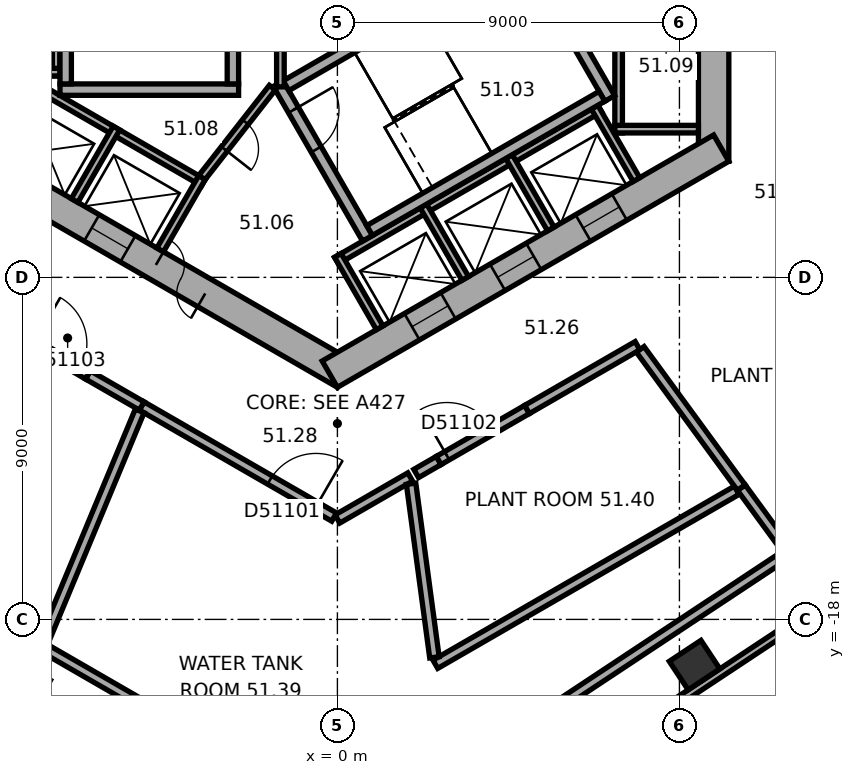
"""IFC4 building model, lengths in metres.
Left out: names, types, materials, properties, quantities, classifications, styles, units other than length and angle.
Written with IfcOpenShell. Run it as: python <this file> out.ifc"""

import sys

from ifc_helpers import new_model, si_unit, direction, frame, frame_2d, origin, origin_2d, place, context, subcontext, project, spatial, rectangle, extrude, element, fill, save


model = new_model("IFC4")
c1 = context("Model", 3, precision=1e-05, world=origin(), true_north=direction((0.0, 1.0)))
c2 = subcontext(c1, "Body", "Model", "MODEL_VIEW")
j1 = project(units=[si_unit("LENGTHUNIT", "METRE"), si_unit("PLANEANGLEUNIT", "RADIAN")], contexts=[c1])
p1 = place(None, origin())
s1 = spatial("IfcSite", under=j1, at=p1, CompositionType="ELEMENT")
p2 = place(p1, origin())
s2 = spatial("IfcBuilding", under=s1, at=p2, CompositionType="ELEMENT")
p3 = place(p2, frame((0.0, 0.0, 205.8)))
s3 = spatial("IfcBuildingStorey", under=s2, at=p3, CompositionType="ELEMENT", Elevation=205.8)
p4 = place(p3, frame((9.398, -19.202, 0.0), z_axis=(0.0, 0.0, 1.0), x_axis=(0.833885822067, 0.551936985312, 0.0)))
e1 = element("IfcColumn", 1, at=p4, inside=s3, PredefinedType="COLUMN", context=c2, shape_type="SweptSolid", body=[
    extrude(rectangle(XDim=1.0, YDim=0.9, at=origin_2d()), origin(), (0.0, 0.0, 1.0), 4.8),
])
p5 = place(p3, frame((9.9, -5.947, 0.0), z_axis=(0.0, 0.0, 1.0), x_axis=(0.0, 1.0, 0.0)))
e2 = element("IfcWall", 2, at=p5, inside=s3, PredefinedType="SHEAR", context=c2, shape_type="SweptSolid", body=[
    extrude(rectangle(XDim=11.894, YDim=0.8, at=frame_2d((5.947, 0.0))), origin(), (0.0, 0.0, 1.0), 4.8),
])
p6 = place(p5, frame((6.147, 0.0, 0.0)))
e3 = element("IfcOpeningElement", 3, at=p6, cuts=e2, PredefinedType="OPENING", context=c2, shape_type="SweptSolid", body=[
    extrude(rectangle(XDim=1.5, YDim=2.1, at=frame_2d((0.75, 1.05))), frame((0.0, 0.41, 0.0), z_axis=(0.0, -1.0, 0.0), x_axis=(1.0, 0.0, 0.0)), (0.0, 0.0, 1.0), 0.82),
])
p7 = place(p5, frame((2.997, 0.0, 0.0)))
e4 = element("IfcOpeningElement", 4, at=p7, cuts=e2, PredefinedType="OPENING", context=c2, shape_type="SweptSolid", body=[
    extrude(rectangle(XDim=0.9, YDim=2.1, at=frame_2d((0.45, 1.05))), frame((0.0, 0.41, 0.0), z_axis=(0.0, -1.0, 0.0), x_axis=(1.0, 0.0, 0.0)), (0.0, 0.0, 1.0), 0.82),
])
p8 = place(p3, frame((-10.1, -5.6, 0.0), z_axis=(0.0, 0.0, 1.0), x_axis=(0.866023897231, -0.500002609418, 0.0)))
e5 = element("IfcWall", 5, at=p8, inside=s3, PredefinedType="SHEAR", context=c2, shape_type="SweptSolid", body=[
    extrude(rectangle(XDim=11.894, YDim=0.8, at=frame_2d((5.947, 0.0))), origin(), (0.0, 0.0, 1.0), 4.8),
])
p9 = place(p8, frame((6.147, 0.0, 0.0)))
e6 = element("IfcOpeningElement", 6, at=p9, cuts=e5, PredefinedType="OPENING", context=c2, shape_type="SweptSolid", body=[
    extrude(rectangle(XDim=1.5, YDim=2.1, at=frame_2d((0.75, 1.05))), frame((0.0, 0.41, 0.0), z_axis=(0.0, -1.0, 0.0), x_axis=(1.0, 0.0, 0.0)), (0.0, 0.0, 1.0), 0.82),
])
p10 = place(p8, frame((1.597, 0.0, 0.0)))
e7 = element("IfcOpeningElement", 7, at=p10, cuts=e5, PredefinedType="OPENING", context=c2, shape_type="SweptSolid", body=[
    extrude(rectangle(XDim=1.1, YDim=2.1, at=frame_2d((0.55, 1.05))), frame((0.0, 0.41, 0.0), z_axis=(0.0, -1.0, 0.0), x_axis=(1.0, 0.0, 0.0)), (0.0, 0.0, 1.0), 0.82),
])
p11 = place(p8, frame((4.197, 0.0, 0.0)))
e8 = element("IfcOpeningElement", 8, at=p11, cuts=e5, PredefinedType="OPENING", context=c2, shape_type="SweptSolid", body=[
    extrude(rectangle(XDim=1.1, YDim=2.1, at=frame_2d((0.55, 1.05))), frame((0.0, 0.41, 0.0), z_axis=(0.0, -1.0, 0.0), x_axis=(1.0, 0.0, 0.0)), (0.0, 0.0, 1.0), 0.82),
])
p12 = place(p3, frame((-0.2, -11.547, 0.0), z_axis=(0.0, 0.0, 1.0), x_axis=(0.866023897231, 0.500002609418, 0.0)))
e9 = element("IfcWall", 9, at=p12, inside=s3, PredefinedType="SHEAR", context=c2, shape_type="SweptSolid", body=[
    extrude(rectangle(XDim=11.894, YDim=0.8, at=frame_2d((5.947, 0.0))), origin(), (0.0, 0.0, 1.0), 4.8),
])
p13 = place(p12, frame((2.497, 0.0, 0.0)))
e10 = element("IfcOpeningElement", 10, at=p13, cuts=e9, PredefinedType="OPENING", context=c2, shape_type="SweptSolid", body=[
    extrude(rectangle(XDim=1.1, YDim=2.1, at=frame_2d((0.55, 1.05))), frame((0.0, 0.41, 0.0), z_axis=(0.0, -1.0, 0.0), x_axis=(1.0, 0.0, 0.0)), (0.0, 0.0, 1.0), 0.82),
])
p14 = place(p12, frame((5.097, 0.0, 0.0)))
e11 = element("IfcOpeningElement", 11, at=p14, cuts=e9, PredefinedType="OPENING", context=c2, shape_type="SweptSolid", body=[
    extrude(rectangle(XDim=1.1, YDim=2.1, at=frame_2d((0.55, 1.05))), frame((0.0, 0.41, 0.0), z_axis=(0.0, -1.0, 0.0), x_axis=(1.0, 0.0, 0.0)), (0.0, 0.0, 1.0), 0.82),
])
p15 = place(p12, frame((7.697, 0.0, 0.0)))
e12 = element("IfcOpeningElement", 12, at=p15, cuts=e9, PredefinedType="OPENING", context=c2, shape_type="SweptSolid", body=[
    extrude(rectangle(XDim=1.1, YDim=2.1, at=frame_2d((0.55, 1.05))), frame((0.0, 0.41, 0.0), z_axis=(0.0, -1.0, 0.0), x_axis=(1.0, 0.0, 0.0)), (0.0, 0.0, 1.0), 0.82),
])
for number, where, z_axis, x_axis in (
    (13, (-18.789, -14.267, 0.0), (0.0, 0.0, 1.0), (0.866, -0.5, 0.0)),
    (14, (2.911, -24.156, 0.0), (0.0, 0.0, 1.0), (0.834, 0.552, 0.0)),
):
    element("IfcWall", number, at=place(p3, frame(where, z_axis=z_axis, x_axis=x_axis)), inside=s3, PredefinedType="STANDARD", context=c2, shape_type="SweptSolid", body=[
        extrude(rectangle(XDim=20.044, YDim=0.2, at=frame_2d((10.022, 0.0))), origin(), (0.0, 0.0, 1.0), 4.8),
    ])
p16 = place(p3, frame((7.4, -5.2, 0.0), z_axis=(0.0, 0.0, 1.0), x_axis=(0.0, 1.0, 0.0)))
e15 = element("IfcWall", 15, at=p16, inside=s3, PredefinedType="PARTITIONING", context=c2, shape_type="SweptSolid", body=[
    extrude(rectangle(XDim=5.4, YDim=0.2, at=frame_2d((2.7, 0.0))), origin(), (0.0, 0.0, 1.0), 4.52),
])
p17 = place(p3, frame((7.3, -5.1, 0.0), z_axis=(0.0, 0.0, 1.0), x_axis=(1.0, 0.0, 0.0)))
e16 = element("IfcWall", 16, at=p17, inside=s3, PredefinedType="PARTITIONING", context=c2, shape_type="SweptSolid", body=[
    extrude(rectangle(XDim=2.2, YDim=0.2, at=frame_2d((1.1, 0.0))), origin(), (0.0, 0.0, 1.0), 4.52),
])
p18 = place(p3, frame((-7.4, 4.3, 0.0), z_axis=(0.0, 0.0, 1.0), x_axis=(0.0, -1.0, 0.0)))
e17 = element("IfcWall", 17, at=p18, inside=s3, PredefinedType="PARTITIONING", context=c2, shape_type="SweptSolid", body=[
    extrude(rectangle(XDim=8.0, YDim=0.2, at=frame_2d((4.0, 0.0))), origin(), (0.0, 0.0, 1.0), 4.52),
])
p19 = place(p3, frame((-7.3, -3.6, 0.0), z_axis=(0.0, 0.0, 1.0), x_axis=(-1.0, 0.0, 0.0)))
e18 = element("IfcWall", 18, at=p19, inside=s3, PredefinedType="PARTITIONING", context=c2, shape_type="SweptSolid", body=[
    extrude(rectangle(XDim=2.2, YDim=0.2, at=frame_2d((1.1, 0.0))), origin(), (0.0, 0.0, 1.0), 4.52),
])
p20 = place(p3, frame((-8.203, -3.809, 0.0), z_axis=(0.0, 0.0, 1.0), x_axis=(0.866028230842, -0.499995103361, 0.0)))
e19 = element("IfcWall", 19, at=p20, inside=s3, PredefinedType="PARTITIONING", context=c2, shape_type="SweptSolid", body=[
    extrude(rectangle(XDim=5.4, YDim=0.2, at=frame_2d((2.7, 0.0))), origin(), (0.0, 0.0, 1.0), 4.52),
])
p21 = place(p3, frame((-5.815, -5.072, 0.0), z_axis=(0.0, 0.0, 1.0), x_axis=(-0.499946605688, -0.86605622881, 0.0)))
e20 = element("IfcWall", 20, at=p21, inside=s3, PredefinedType="PARTITIONING", context=c2, shape_type="SweptSolid", body=[
    extrude(rectangle(XDim=2.2, YDim=0.2, at=frame_2d((1.1, 0.0))), origin(), (0.0, 0.0, 1.0), 4.52),
])
p22 = place(p3, frame((-3.563, -6.372, 0.0), z_axis=(0.0, 0.0, 1.0), x_axis=(-0.499994660107, -0.866028486751, 0.0)))
e21 = element("IfcWall", 21, at=p22, inside=s3, PredefinedType="PARTITIONING", context=c2, shape_type="SweptSolid", body=[
    extrude(rectangle(XDim=2.2, YDim=0.2, at=frame_2d((1.1, 0.0))), origin(), (0.0, 0.0, 1.0), 4.52),
])
p23 = place(p3, frame((-0.024, -8.559, 0.0), z_axis=(0.0, 0.0, 1.0), x_axis=(0.866026010844, 0.49999894854, 0.0)))
e22 = element("IfcWall", 22, at=p23, inside=s3, PredefinedType="PARTITIONING", context=c2, shape_type="SweptSolid", body=[
    extrude(rectangle(XDim=8.0, YDim=0.2, at=frame_2d((4.0, 0.0))), origin(), (0.0, 0.0, 1.0), 4.52),
])
for number, where, z_axis, x_axis in (
    (23, (0.013, -8.422, 0.0), (0.0, 0.0, 1.0), (0.5, -0.866, 0.0)),
    (24, (2.264, -7.122, 0.0), (0.0, 0.0, 1.0), (0.5, -0.866, 0.0)),
    (25, (4.516, -5.822, 0.0), (0.0, 0.0, 1.0), (0.5, -0.866, 0.0)),
    (26, (6.768, -4.522, 0.0), (0.0, 0.0, 1.0), (0.5, -0.866, 0.0)),
):
    element("IfcWall", number, at=place(p3, frame(where, z_axis=z_axis, x_axis=x_axis)), inside=s3, PredefinedType="PARTITIONING", context=c2, shape_type="SweptSolid", body=[
        extrude(rectangle(XDim=2.2, YDim=0.2, at=frame_2d((1.1, 0.0))), origin(), (0.0, 0.0, 1.0), 4.52),
    ])
p24 = place(p3, frame((-2.6, -4.06, 0.0), z_axis=(0.0, 0.0, 1.0), x_axis=(-1.0, 0.0, 0.0)))
e27 = element("IfcWall", 27, at=p24, inside=s3, PredefinedType="SHEAR", context=c2, shape_type="SweptSolid", body=[
    extrude(rectangle(XDim=4.7, YDim=0.3, at=frame_2d((2.35, 0.0))), origin(), (0.0, 0.0, 1.0), 4.52),
])
for number, where, z_axis, x_axis in (
    (28, (-2.75, 3.15, 0.0), (0.0, 0.0, 1.0), (0.0, -1.0, 0.0)),
    (29, (-7.15, 3.15, 0.0), (0.0, 0.0, 1.0), (0.0, -1.0, 0.0)),
):
    element("IfcWall", number, at=place(p3, frame(where, z_axis=z_axis, x_axis=x_axis)), inside=s3, PredefinedType="SHEAR", context=c2, shape_type="SweptSolid", body=[
        extrude(rectangle(XDim=7.06, YDim=0.3, at=frame_2d((3.53, 0.0))), origin(), (0.0, 0.0, 1.0), 4.52),
    ])
p25 = place(p3, frame((-1.558, -3.902, 0.0), z_axis=(0.0, 0.0, 1.0), x_axis=(0.499977259774, -0.866038532462, 0.0)))
e30 = element("IfcWall", 30, at=p25, inside=s3, PredefinedType="SHEAR", context=c2, shape_type="SweptSolid", body=[
    extrude(rectangle(XDim=4.7, YDim=0.3, at=frame_2d((2.35, 0.0))), origin(), (0.0, 0.0, 1.0), 4.52),
])
p26 = place(p25, frame((0.8, 0.0, 0.0)))
e31 = element("IfcOpeningElement", 31, at=p26, cuts=e30, PredefinedType="OPENING", context=c2, shape_type="SweptSolid", body=[
    extrude(rectangle(XDim=1.2, YDim=2.1, at=frame_2d((0.6, 1.05))), frame((0.0, 0.16, 0.0), z_axis=(0.0, -1.0, 0.0), x_axis=(1.0, 0.0, 0.0)), (0.0, 0.0, 1.0), 0.32),
])
p27 = place(p3, frame((4.816, -0.222, 0.0), z_axis=(0.0, 0.0, 1.0), x_axis=(0.499977259774, -0.866038532462, 0.0)))
e32 = element("IfcWall", 32, at=p27, inside=s3, PredefinedType="SHEAR", context=c2, shape_type="SweptSolid", body=[
    extrude(rectangle(XDim=4.7, YDim=0.3, at=frame_2d((2.35, 0.0))), origin(), (0.0, 0.0, 1.0), 4.52),
])
for number, where, z_axis, x_axis in (
    (33, (-1.353, -3.957, 0.0), (0.0, 0.0, 1.0), (0.866, 0.5, 0.0)),
    (34, (0.847, -7.767, 0.0), (0.0, 0.0, 1.0), (0.866, 0.5, 0.0)),
):
    element("IfcWall", number, at=place(p3, frame(where, z_axis=z_axis, x_axis=x_axis)), inside=s3, PredefinedType="SHEAR", context=c2, shape_type="SweptSolid", body=[
        extrude(rectangle(XDim=7.06, YDim=0.3, at=frame_2d((3.53, 0.0))), origin(), (0.0, 0.0, 1.0), 4.52),
    ])
p28 = place(p3, frame((-1.712, -4.008, 0.0), z_axis=(0.0, 0.0, 1.0), x_axis=(-0.616549420702, -0.787316208287, 0.0)))
e35 = element("IfcWall", 35, at=p28, inside=s3, PredefinedType="PARTITIONING", context=c2, shape_type="SweptSolid", body=[
    extrude(rectangle(XDim=3.002, YDim=0.2, at=frame_2d((1.501, 0.0))), origin(), (0.0, 0.0, 1.0), 4.52),
])
p29 = place(p28, frame((1.15, 0.0, 0.0)))
e36 = element("IfcOpeningElement", 36, at=p29, cuts=e35, PredefinedType="OPENING", context=c2, shape_type="SweptSolid", body=[
    extrude(rectangle(XDim=0.9, YDim=2.1, at=frame_2d((0.45, 1.05))), frame((0.0, 0.11, 0.0), z_axis=(0.0, -1.0, 0.0), x_axis=(1.0, 0.0, 0.0)), (0.0, 0.0, 1.0), 0.22),
])
p30 = place(p3, frame((-1.5, -3.988, 0.0), z_axis=(0.0, 0.0, 1.0), x_axis=(0.0, 1.0, 0.0)))
e37 = element("IfcWall", 37, at=p30, inside=s3, PredefinedType="PARTITIONING", context=c2, shape_type="SweptSolid", body=[
    extrude(rectangle(XDim=7.977, YDim=0.2, at=frame_2d((3.988, 0.0))), origin(), (0.0, 0.0, 1.0), 4.52),
])
p31 = place(p3, frame((-0.988, -22.639, 0.0), z_axis=(0.0, 0.0, 1.0), x_axis=(-0.866009406207, 0.500027707594, 0.0)))
e38 = element("IfcWall", 38, at=p31, inside=s3, PredefinedType="SOLIDWALL", context=c2, shape_type="SweptSolid", body=[
    extrude(rectangle(XDim=7.846, YDim=0.25, at=frame_2d((3.923, 0.0))), origin(), (0.0, 0.0, 1.0), 4.02),
])
p32 = place(p3, frame((11.873, -16.251, 0.0), z_axis=(0.0, 0.0, 1.0), x_axis=(-0.833861924464, -0.551973088953, 0.0)))
e39 = element("IfcWall", 39, at=p32, inside=s3, PredefinedType="SOLIDWALL", context=c2, shape_type="SweptSolid", body=[
    extrude(rectangle(XDim=10.651, YDim=0.25, at=frame_2d((5.326, 0.0))), origin(), (0.0, 0.0, 1.0), 4.02),
])
p33 = place(p3, frame((11.796, -16.128, 0.0), z_axis=(0.0, 0.0, 1.0), x_axis=(-0.59041584791, 0.807099204891, 0.0)))
e40 = element("IfcWall", 40, at=p33, inside=s3, PredefinedType="SOLIDWALL", context=c2, shape_type="SweptSolid", body=[
    extrude(rectangle(XDim=1.977, YDim=0.25, at=frame_2d((0.989, 0.0))), origin(), (0.0, 0.0, 1.0), 3.6),
])
p34 = place(p3, frame((0.0, -15.357, 0.0), z_axis=(0.0, 0.0, 1.0), x_axis=(0.866060565847, 0.499939092575, 0.0)))
e41 = element("IfcWall", 41, at=p34, inside=s3, PredefinedType="SOLIDWALL", context=c2, shape_type="SweptSolid", body=[
    extrude(rectangle(XDim=2.211, YDim=0.25, at=frame_2d((1.105, 0.0))), origin(), (0.0, 0.0, 1.0), 4.52),
])
p35 = place(p3, frame((-0.087, -15.308, 0.0), z_axis=(0.0, 0.0, 1.0), x_axis=(-0.866016588558, 0.50001526811, 0.0)))
e42 = element("IfcWall", 42, at=p35, inside=s3, PredefinedType="SOLIDWALL", context=c2, shape_type="SweptSolid", body=[
    extrude(rectangle(XDim=5.846, YDim=0.25, at=frame_2d((2.923, 0.0))), origin(), (0.0, 0.0, 1.0), 4.52),
])
p36 = place(p35, frame((0.55, 0.0, 0.0)))
e43 = element("IfcOpeningElement", 43, at=p36, cuts=e42, PredefinedType="OPENING", context=c2, shape_type="SweptSolid", body=[
    extrude(rectangle(XDim=1.4, YDim=2.1, at=frame_2d((0.7, 1.05))), frame((0.0, 0.135, 0.0), z_axis=(0.0, -1.0, 0.0), x_axis=(1.0, 0.0, 0.0)), (0.0, 0.0, 1.0), 0.27),
])
p37 = place(p3, frame((10.508, -14.603, 0.0), z_axis=(0.0, 0.0, 1.0), x_axis=(-0.86603774239, -0.499978628299, 0.0)))
e44 = element("IfcWall", 44, at=p37, inside=s3, PredefinedType="SOLIDWALL", context=c2, shape_type="SweptSolid", body=[
    extrude(rectangle(XDim=9.157, YDim=0.25, at=frame_2d((4.579, 0.0))), origin(), (0.0, 0.0, 1.0), 4.52),
])
p38 = place(p3, frame((1.939, -14.43, 0.0), z_axis=(0.0, 0.0, 1.0), x_axis=(0.133228901291, -0.991085293938, 0.0)))
e45 = element("IfcWall", 45, at=p38, inside=s3, PredefinedType="SOLIDWALL", context=c2, shape_type="SweptSolid", body=[
    extrude(rectangle(XDim=4.609, YDim=0.25, at=frame_2d((2.304, 0.0))), origin(), (0.0, 0.0, 1.0), 3.6),
])
p39 = place(p3, frame((2.667, -13.818, 0.0), z_axis=(0.0, 0.0, 1.0), x_axis=(-0.86630994195, -0.499506841272, 0.0)))
e46 = element("IfcWall", 46, at=p39, inside=s3, PredefinedType="SOLIDWALL", context=c2, shape_type="SweptSolid", body=[
    extrude(rectangle(XDim=0.686, YDim=0.25, at=frame_2d((0.343, 0.0))), origin(), (0.0, 0.0, 1.0), 4.52),
])
p40 = place(p3, frame((2.667, -13.818, 0.0), z_axis=(0.0, 0.0, 1.0), x_axis=(0.866017414952, 0.500013836808, 0.0)))
e47 = element("IfcWall", 47, at=p40, inside=s3, PredefinedType="SOLIDWALL", context=c2, shape_type="SweptSolid", body=[
    extrude(rectangle(XDim=2.684, YDim=0.25, at=frame_2d((1.342, 0.0))), origin(), (0.0, 0.0, 1.0), 4.52),
])
p41 = place(p40, frame((0.25, 0.0, 0.0)))
e48 = element("IfcOpeningElement", 48, at=p41, cuts=e47, PredefinedType="OPENING", context=c2, shape_type="SweptSolid", body=[
    extrude(rectangle(XDim=1.4, YDim=2.1, at=frame_2d((0.7, 1.05))), frame((0.0, 0.135, 0.0), z_axis=(0.0, -1.0, 0.0), x_axis=(1.0, 0.0, 0.0)), (0.0, 0.0, 1.0), 0.27),
])
p42 = place(p3, frame((-5.203, -12.514, 0.0), z_axis=(0.0, 0.0, 1.0), x_axis=(-0.383964269763, -0.923347951503, 0.0)))
e49 = element("IfcWall", 49, at=p42, inside=s3, PredefinedType="SOLIDWALL", context=c2, shape_type="SweptSolid", body=[
    extrude(rectangle(XDim=6.577, YDim=0.25, at=frame_2d((3.289, 0.0))), origin(), (0.0, 0.0, 1.0), 3.6),
])
p43 = place(p3, frame((4.99, -12.476, 0.0), z_axis=(0.0, 0.0, 1.0), x_axis=(0.86607294768, 0.499917642513, 0.0)))
e50 = element("IfcWall", 50, at=p43, inside=s3, PredefinedType="SOLIDWALL", context=c2, shape_type="SweptSolid", body=[
    extrude(rectangle(XDim=3.356, YDim=0.25, at=frame_2d((1.678, 0.0))), origin(), (0.0, 0.0, 1.0), 4.52),
])
p44 = place(p3, frame((-6.563, -11.568, 0.0), z_axis=(0.0, 0.0, 1.0), x_axis=(0.866026229868, -0.499998569178, 0.0)))
e51 = element("IfcWall", 51, at=p44, inside=s3, PredefinedType="SOLIDWALL", context=c2, shape_type="SweptSolid", body=[
    extrude(rectangle(XDim=1.633, YDim=0.25, at=frame_2d((0.816, 0.0))), origin(), (0.0, 0.0, 1.0), 4.52),
])
p45 = place(p3, frame((7.968, -10.895, 0.0), z_axis=(0.0, 0.0, 1.0), x_axis=(0.590348117022, -0.807148747585, 0.0)))
e52 = element("IfcWall", 52, at=p45, inside=s3, PredefinedType="SOLIDWALL", context=c2, shape_type="SweptSolid", body=[
    extrude(rectangle(XDim=4.504, YDim=0.25, at=frame_2d((2.252, 0.0))), origin(), (0.0, 0.0, 1.0), 3.6),
])
p46 = place(p3, frame((-11.269, -8.852, 0.0), z_axis=(0.0, 0.0, 1.0), x_axis=(0.866019457076, -0.500010299859, 0.0)))
e53 = element("IfcWall", 53, at=p46, inside=s3, PredefinedType="SOLIDWALL", context=c2, shape_type="SweptSolid", body=[
    extrude(rectangle(XDim=5.433, YDim=0.25, at=frame_2d((2.717, 0.0))), origin(), (0.0, 0.0, 1.0), 4.52),
])
p47 = place(p46, frame((3.783, 0.0, 0.0)))
e54 = element("IfcOpeningElement", 54, at=p47, cuts=e53, PredefinedType="OPENING", context=c2, shape_type="SweptSolid", body=[
    extrude(rectangle(XDim=1.4, YDim=2.1, at=frame_2d((0.7, 1.05))), frame((0.0, 0.135, 0.0), z_axis=(0.0, -1.0, 0.0), x_axis=(1.0, 0.0, 0.0)), (0.0, 0.0, 1.0), 0.27),
])
p48 = place(p9, origin())
e55 = element("IfcDoor", 55, at=p48, inside=s3, OperationType="DOUBLE_DOOR_SINGLE_SWING", PredefinedType="DOOR", context=c2, shape_type="SweptSolid", body=[
    extrude(rectangle(XDim=1.5, YDim=2.1, at=frame_2d((0.75, 1.05))), frame((0.0, 0.025, 0.0), z_axis=(0.0, -1.0, 0.0), x_axis=(1.0, 0.0, 0.0)), (0.0, 0.0, 1.0), 0.05),
])
fill(e6, e55)
p49 = place(p26, origin())
e56 = element("IfcDoor", 56, at=p49, inside=s3, OperationType="SINGLE_SWING_RIGHT", PredefinedType="DOOR", context=c2, shape_type="SweptSolid", body=[
    extrude(rectangle(XDim=1.2, YDim=2.1, at=frame_2d((0.6, 1.05))), frame((0.0, 0.025, 0.0), z_axis=(0.0, -1.0, 0.0), x_axis=(1.0, 0.0, 0.0)), (0.0, 0.0, 1.0), 0.05),
])
fill(e31, e56)
p50 = place(p29, origin())
e57 = element("IfcDoor", 57, at=p50, inside=s3, OperationType="SINGLE_SWING_LEFT", PredefinedType="DOOR", context=c2, shape_type="SweptSolid", body=[
    extrude(rectangle(XDim=0.9, YDim=2.1, at=frame_2d((0.45, 1.05))), frame((0.0, 0.025, 0.0), z_axis=(0.0, -1.0, 0.0), x_axis=(1.0, 0.0, 0.0)), (0.0, 0.0, 1.0), 0.05),
])
fill(e36, e57)
p51 = place(p11, origin())
e58 = element("IfcDoor", 58, at=p51, inside=s3, OperationType="DOUBLE_DOOR_SLIDING", PredefinedType="DOOR", context=c2, shape_type="SweptSolid", body=[
    extrude(rectangle(XDim=1.1, YDim=2.1, at=frame_2d((0.55, 1.05))), frame((0.0, 0.025, 0.0), z_axis=(0.0, -1.0, 0.0), x_axis=(1.0, 0.0, 0.0)), (0.0, 0.0, 1.0), 0.05),
])
fill(e8, e58)
p52 = place(p13, origin())
e59 = element("IfcDoor", 59, at=p52, inside=s3, OperationType="DOUBLE_DOOR_SLIDING", PredefinedType="DOOR", context=c2, shape_type="SweptSolid", body=[
    extrude(rectangle(XDim=1.1, YDim=2.1, at=frame_2d((0.55, 1.05))), frame((0.0, 0.025, 0.0), z_axis=(0.0, -1.0, 0.0), x_axis=(1.0, 0.0, 0.0)), (0.0, 0.0, 1.0), 0.05),
])
fill(e10, e59)
p53 = place(p14, origin())
e60 = element("IfcDoor", 60, at=p53, inside=s3, OperationType="DOUBLE_DOOR_SLIDING", PredefinedType="DOOR", context=c2, shape_type="SweptSolid", body=[
    extrude(rectangle(XDim=1.1, YDim=2.1, at=frame_2d((0.55, 1.05))), frame((0.0, 0.025, 0.0), z_axis=(0.0, -1.0, 0.0), x_axis=(1.0, 0.0, 0.0)), (0.0, 0.0, 1.0), 0.05),
])
fill(e11, e60)
p54 = place(p15, origin())
e61 = element("IfcDoor", 61, at=p54, inside=s3, OperationType="DOUBLE_DOOR_SLIDING", PredefinedType="DOOR", context=c2, shape_type="SweptSolid", body=[
    extrude(rectangle(XDim=1.1, YDim=2.1, at=frame_2d((0.55, 1.05))), frame((0.0, 0.025, 0.0), z_axis=(0.0, -1.0, 0.0), x_axis=(1.0, 0.0, 0.0)), (0.0, 0.0, 1.0), 0.05),
])
fill(e12, e61)
p55 = place(p36, origin())
e62 = element("IfcDoor", 62, at=p55, inside=s3, OperationType="SINGLE_SWING_LEFT", PredefinedType="DOOR", context=c2, shape_type="SweptSolid", body=[
    extrude(rectangle(XDim=1.4, YDim=2.1, at=frame_2d((0.7, 1.05))), frame((0.0, 0.025, 0.0), z_axis=(0.0, -1.0, 0.0), x_axis=(1.0, 0.0, 0.0)), (0.0, 0.0, 1.0), 0.05),
])
fill(e43, e62)
p56 = place(p41, origin())
e63 = element("IfcDoor", 63, at=p56, inside=s3, OperationType="SINGLE_SWING_LEFT", PredefinedType="DOOR", context=c2, shape_type="SweptSolid", body=[
    extrude(rectangle(XDim=1.4, YDim=2.1, at=frame_2d((0.7, 1.05))), frame((0.0, 0.025, 0.0), z_axis=(0.0, -1.0, 0.0), x_axis=(1.0, 0.0, 0.0)), (0.0, 0.0, 1.0), 0.05),
])
fill(e48, e63)
p57 = place(p47, origin())
e64 = element("IfcDoor", 64, at=p57, inside=s3, OperationType="SINGLE_SWING_LEFT", PredefinedType="DOOR", context=c2, shape_type="SweptSolid", body=[
    extrude(rectangle(XDim=1.4, YDim=2.1, at=frame_2d((0.7, 1.05))), frame((0.0, 0.025, 0.0), z_axis=(0.0, -1.0, 0.0), x_axis=(1.0, 0.0, 0.0)), (0.0, 0.0, 1.0), 0.05),
])
fill(e54, e64)
save(model, sys.argv[1])
